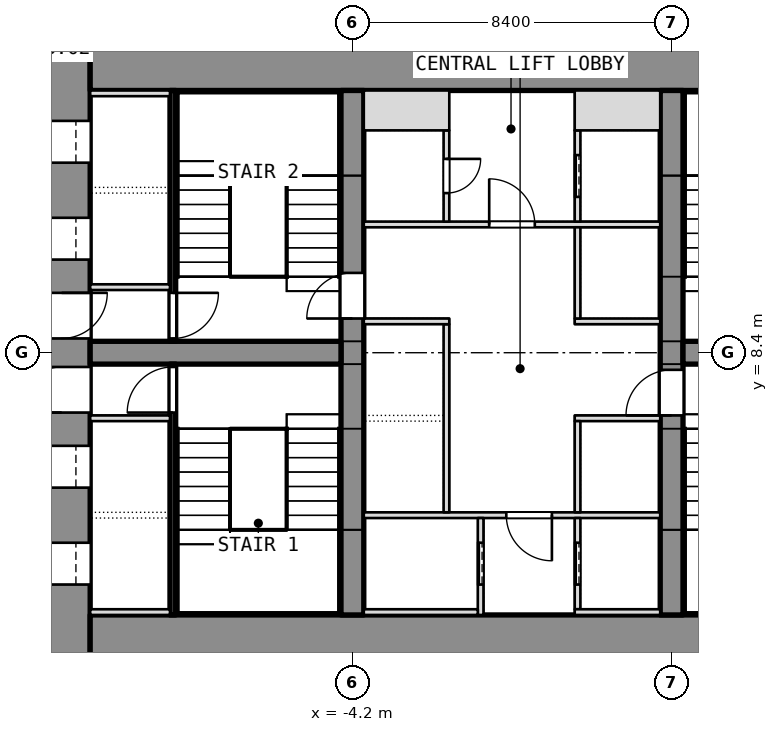
"""IFC4 building model, lengths in metres.
Left out: names, types, materials, properties, quantities, classifications, styles, units other than length and angle.
Written with IfcOpenShell. Run it as: python <this file> out.ifc"""

import sys

from ifc_helpers import new_model, si_unit, direction, frame, frame_2d, origin, place, context, subcontext, project, spatial, rectangle, extrude, element, fill, save


model = new_model("IFC4")
c1 = context("Model", 3, precision=1e-05, world=origin(), true_north=direction((0.0, 1.0)))
c2 = subcontext(c1, "Body", "Model", "MODEL_VIEW")
j1 = project(units=[si_unit("LENGTHUNIT", "METRE"), si_unit("PLANEANGLEUNIT", "RADIAN")], contexts=[c1])
p1 = place(None, origin())
s1 = spatial("IfcSite", under=j1, at=p1, CompositionType="ELEMENT")
p2 = place(p1, origin())
s2 = spatial("IfcBuilding", under=s1, at=p2, CompositionType="ELEMENT")
p3 = place(p2, frame((0.0, 0.0, 8.0)))
s3 = spatial("IfcBuildingStorey", under=s2, at=p3, CompositionType="ELEMENT", Elevation=8.0)
p4 = place(p3, frame((-11.85, 0.0, 0.0), z_axis=(0.0, 0.0, 1.0), x_axis=(0.0, 1.0, 0.0)))
e1 = element("IfcWall", 1, at=p4, inside=s3, PredefinedType="SHEAR", context=c2, shape_type="SweptSolid", body=[
    extrude(rectangle(XDim=16.8, YDim=1.5, at=frame_2d((8.4, 0.0))), origin(), (0.0, 0.0, 1.0), 5.0),
])
p5 = place(p4, frame((2.3, 0.0, 0.0)))
e2 = element("IfcOpeningElement", 2, at=p5, cuts=e1, PredefinedType="OPENING", context=c2, shape_type="SweptSolid", body=[
    extrude(rectangle(XDim=1.1, YDim=2.1, at=frame_2d((0.55, 1.05))), frame((0.0, 0.75, 0.0), z_axis=(0.0, -1.0, 0.0), x_axis=(1.0, 0.0, 0.0)), (0.0, 0.0, 1.0), 1.5),
])
p6 = place(p4, frame((4.85, 0.0, 0.0)))
e3 = element("IfcOpeningElement", 3, at=p6, cuts=e1, PredefinedType="OPENING", context=c2, shape_type="SweptSolid", body=[
    extrude(rectangle(XDim=1.1, YDim=2.1, at=frame_2d((0.55, 1.05))), frame((0.0, 0.75, 0.0), z_axis=(0.0, -1.0, 0.0), x_axis=(1.0, 0.0, 0.0)), (0.0, 0.0, 1.0), 1.5),
])
p7 = place(p4, frame((6.825, 0.0, 0.0)))
e4 = element("IfcOpeningElement", 4, at=p7, cuts=e1, PredefinedType="OPENING", context=c2, shape_type="SweptSolid", body=[
    extrude(rectangle(XDim=1.2, YDim=2.1, at=frame_2d((0.6, 1.05))), frame((0.0, 0.75, 0.0), z_axis=(0.0, -1.0, 0.0), x_axis=(1.0, 0.0, 0.0)), (0.0, 0.0, 1.0), 1.5),
])
p8 = place(p4, frame((13.4, 0.0, 0.0)))
e5 = element("IfcOpeningElement", 5, at=p8, cuts=e1, PredefinedType="OPENING", context=c2, shape_type="SweptSolid", body=[
    extrude(rectangle(XDim=1.1, YDim=2.1, at=frame_2d((0.55, 1.05))), frame((0.0, 0.75, 0.0), z_axis=(0.0, -1.0, 0.0), x_axis=(1.0, 0.0, 0.0)), (0.0, 0.0, 1.0), 1.5),
])
p9 = place(p4, frame((10.85, 0.0, 0.0)))
e6 = element("IfcOpeningElement", 6, at=p9, cuts=e1, PredefinedType="OPENING", context=c2, shape_type="SweptSolid", body=[
    extrude(rectangle(XDim=1.1, YDim=2.1, at=frame_2d((0.55, 1.05))), frame((0.0, 0.75, 0.0), z_axis=(0.0, -1.0, 0.0), x_axis=(1.0, 0.0, 0.0)), (0.0, 0.0, 1.0), 1.5),
])
p10 = place(p4, frame((8.775, 0.0, 0.0)))
e7 = element("IfcOpeningElement", 7, at=p10, cuts=e1, PredefinedType="OPENING", context=c2, shape_type="SweptSolid", body=[
    extrude(rectangle(XDim=1.2, YDim=2.1, at=frame_2d((0.6, 1.05))), frame((0.0, 0.75, 0.0), z_axis=(0.0, -1.0, 0.0), x_axis=(1.0, 0.0, 0.0)), (0.0, 0.0, 1.0), 1.5),
])
for number, where, z_axis, x_axis in (
    (8, (-11.1, 0.75, 0.0), (0.0, 0.0, 1.0), (1.0, 0.0, 0.0)),
    (9, (-11.1, 16.05, 0.0), (0.0, 0.0, 1.0), (1.0, 0.0, 0.0)),
):
    element("IfcWall", number, at=place(p3, frame(where, z_axis=z_axis, x_axis=x_axis)), inside=s3, PredefinedType="SHEAR", context=c2, shape_type="SweptSolid", body=[
        extrude(rectangle(XDim=22.2, YDim=1.5, at=frame_2d((11.1, 0.0))), origin(), (0.0, 0.0, 1.0), 5.0),
    ])
p11 = place(p3, frame((-4.2, 1.5, 0.0), z_axis=(0.0, 0.0, 1.0), x_axis=(0.0, 1.0, 0.0)))
e10 = element("IfcWall", 10, at=p11, inside=s3, PredefinedType="SHEAR", context=c2, shape_type="SweptSolid", body=[
    extrude(rectangle(XDim=13.8, YDim=0.6, at=frame_2d((6.9, 0.0))), origin(), (0.0, 0.0, 1.0), 5.0),
])
p12 = place(p11, frame((7.8, 0.0, 0.0)))
e11 = element("IfcOpeningElement", 11, at=p12, cuts=e10, PredefinedType="OPENING", context=c2, shape_type="SweptSolid", body=[
    extrude(rectangle(XDim=1.2, YDim=2.1, at=frame_2d((0.6, 1.05))), frame((0.0, 0.3, 0.0), z_axis=(0.0, -1.0, 0.0), x_axis=(1.0, 0.0, 0.0)), (0.0, 0.0, 1.0), 0.6),
])
p13 = place(p3, frame((4.2, 1.5, 0.0), z_axis=(0.0, 0.0, 1.0), x_axis=(0.0, 1.0, 0.0)))
e12 = element("IfcWall", 12, at=p13, inside=s3, PredefinedType="SHEAR", context=c2, shape_type="SweptSolid", body=[
    extrude(rectangle(XDim=13.8, YDim=0.6, at=frame_2d((6.9, 0.0))), origin(), (0.0, 0.0, 1.0), 5.0),
])
p14 = place(p13, frame((5.25, 0.0, 0.0)))
e13 = element("IfcOpeningElement", 13, at=p14, cuts=e12, PredefinedType="OPENING", context=c2, shape_type="SweptSolid", body=[
    extrude(rectangle(XDim=1.2, YDim=2.1, at=frame_2d((0.6, 1.05))), frame((0.0, 0.3, 0.0), z_axis=(0.0, -1.0, 0.0), x_axis=(1.0, 0.0, 0.0)), (0.0, 0.0, 1.0), 0.6),
])
for number, where, z_axis, x_axis in (
    (14, (-11.1, 8.4, 0.0), (0.0, 0.0, 1.0), (1.0, 0.0, 0.0)),
    (15, (4.5, 8.4, 0.0), (0.0, 0.0, 1.0), (1.0, 0.0, 0.0)),
):
    element("IfcWall", number, at=place(p3, frame(where, z_axis=z_axis, x_axis=x_axis)), inside=s3, PredefinedType="SHEAR", context=c2, shape_type="SweptSolid", body=[
        extrude(rectangle(XDim=6.6, YDim=0.6, at=frame_2d((3.3, 0.0))), origin(), (0.0, 0.0, 1.0), 5.0),
    ])
p15 = place(p3, frame((-8.925, 1.5, 0.0), z_axis=(0.0, 0.0, 1.0), x_axis=(0.0, 1.0, 0.0)))
e16 = element("IfcWall", 16, at=p15, inside=s3, PredefinedType="SHEAR", context=c2, shape_type="SweptSolid", body=[
    extrude(rectangle(XDim=6.6, YDim=0.15, at=frame_2d((3.3, 0.0))), origin(), (0.0, 0.0, 1.0), 4.78),
])
p16 = place(p15, frame((5.325, 0.0, 0.0)))
e17 = element("IfcOpeningElement", 17, at=p16, cuts=e16, PredefinedType="OPENING", context=c2, shape_type="SweptSolid", body=[
    extrude(rectangle(XDim=1.2, YDim=2.1, at=frame_2d((0.6, 1.05))), frame((0.0, 0.075, 0.0), z_axis=(0.0, -1.0, 0.0), x_axis=(1.0, 0.0, 0.0)), (0.0, 0.0, 1.0), 0.15),
])
for number, where, z_axis, x_axis in (
    (18, (-11.1, 6.675, 0.0), (0.0, 0.0, 1.0), (1.0, 0.0, 0.0)),
    (19, (-11.1, 1.575, 0.0), (0.0, 0.0, 1.0), (1.0, 0.0, 0.0)),
):
    element("IfcWall", number, at=place(p3, frame(where, z_axis=z_axis, x_axis=x_axis)), inside=s3, PredefinedType="SHEAR", context=c2, shape_type="SweptSolid", body=[
        extrude(rectangle(XDim=2.1, YDim=0.15, at=frame_2d((1.05, 0.0))), origin(), (0.0, 0.0, 1.0), 5.0),
    ])
p17 = place(p3, frame((-8.925, 8.7, 0.0), z_axis=(0.0, 0.0, 1.0), x_axis=(0.0, 1.0, 0.0)))
e20 = element("IfcWall", 20, at=p17, inside=s3, PredefinedType="SHEAR", context=c2, shape_type="SweptSolid", body=[
    extrude(rectangle(XDim=6.6, YDim=0.15, at=frame_2d((3.3, 0.0))), origin(), (0.0, 0.0, 1.0), 4.78),
])
p18 = place(p17, frame((0.075, 0.0, 0.0)))
e21 = element("IfcOpeningElement", 21, at=p18, cuts=e20, PredefinedType="OPENING", context=c2, shape_type="SweptSolid", body=[
    extrude(rectangle(XDim=1.2, YDim=2.1, at=frame_2d((0.6, 1.05))), frame((0.0, 0.075, 0.0), z_axis=(0.0, -1.0, 0.0), x_axis=(1.0, 0.0, 0.0)), (0.0, 0.0, 1.0), 0.15),
])
for number, where, z_axis, x_axis in (
    (22, (-11.1, 10.125, 0.0), (0.0, 0.0, 1.0), (1.0, 0.0, 0.0)),
    (23, (-11.1, 15.225, 0.0), (0.0, 0.0, 1.0), (1.0, 0.0, 0.0)),
):
    element("IfcWall", number, at=place(p3, frame(where, z_axis=z_axis, x_axis=x_axis)), inside=s3, PredefinedType="SHEAR", context=c2, shape_type="SweptSolid", body=[
        extrude(rectangle(XDim=2.1, YDim=0.15, at=frame_2d((1.05, 0.0))), origin(), (0.0, 0.0, 1.0), 5.0),
    ])
p19 = place(p3, frame((-3.9, 4.125, 0.0), z_axis=(0.0, 0.0, 1.0), x_axis=(1.0, 0.0, 0.0)))
e24 = element("IfcWall", 24, at=p19, inside=s3, PredefinedType="PARTITIONING", context=c2, shape_type="SweptSolid", body=[
    extrude(rectangle(XDim=7.8, YDim=0.15, at=frame_2d((3.9, 0.0))), origin(), (0.0, 0.0, 1.0), 4.78),
])
p20 = place(p19, frame((3.75, 0.0, 0.0)))
e25 = element("IfcOpeningElement", 25, at=p20, cuts=e24, PredefinedType="OPENING", context=c2, shape_type="SweptSolid", body=[
    extrude(rectangle(XDim=1.2, YDim=2.1, at=frame_2d((0.6, 1.05))), frame((0.0, 0.075, 0.0), z_axis=(0.0, -1.0, 0.0), x_axis=(1.0, 0.0, 0.0)), (0.0, 0.0, 1.0), 0.15),
])
p21 = place(p3, frame((-3.9, 11.775, 0.0), z_axis=(0.0, 0.0, 1.0), x_axis=(1.0, 0.0, 0.0)))
e26 = element("IfcWall", 26, at=p21, inside=s3, PredefinedType="PARTITIONING", context=c2, shape_type="SweptSolid", body=[
    extrude(rectangle(XDim=7.8, YDim=0.15, at=frame_2d((3.9, 0.0))), origin(), (0.0, 0.0, 1.0), 4.78),
])
p22 = place(p21, frame((3.3, 0.0, 0.0)))
e27 = element("IfcOpeningElement", 27, at=p22, cuts=e26, PredefinedType="OPENING", context=c2, shape_type="SweptSolid", body=[
    extrude(rectangle(XDim=1.2, YDim=2.1, at=frame_2d((0.6, 1.05))), frame((0.0, 0.075, 0.0), z_axis=(0.0, -1.0, 0.0), x_axis=(1.0, 0.0, 0.0)), (0.0, 0.0, 1.0), 0.15),
])
p23 = place(p3, frame((-0.825, 1.5, 0.0), z_axis=(0.0, 0.0, 1.0), x_axis=(0.0, 1.0, 0.0)))
e28 = element("IfcWall", 28, at=p23, inside=s3, PredefinedType="SHEAR", context=c2, shape_type="SweptSolid", body=[
    extrude(rectangle(XDim=2.55, YDim=0.15, at=frame_2d((1.275, 0.0))), origin(), (0.0, 0.0, 1.0), 5.0),
])
p24 = place(p23, frame((0.8, 0.0, 0.0)))
e29 = element("IfcOpeningElement", 29, at=p24, cuts=e28, PredefinedType="OPENING", context=c2, shape_type="SweptSolid", body=[
    extrude(rectangle(XDim=1.1, YDim=2.1, at=frame_2d((0.55, 1.05))), frame((0.0, 0.075, 0.0), z_axis=(0.0, -1.0, 0.0), x_axis=(1.0, 0.0, 0.0)), (0.0, 0.0, 1.0), 0.15),
])
p25 = place(p3, frame((-3.9, 1.575, 0.0), z_axis=(0.0, 0.0, 1.0), x_axis=(1.0, 0.0, 0.0)))
e30 = element("IfcWall", 30, at=p25, inside=s3, PredefinedType="SHEAR", context=c2, shape_type="SweptSolid", body=[
    extrude(rectangle(XDim=3.0, YDim=0.15, at=frame_2d((1.5, 0.0))), origin(), (0.0, 0.0, 1.0), 5.0),
])
p26 = place(p3, frame((-1.725, 4.2, 0.0), z_axis=(0.0, 0.0, 1.0), x_axis=(0.0, 1.0, 0.0)))
e31 = element("IfcWall", 31, at=p26, inside=s3, PredefinedType="SHEAR", context=c2, shape_type="SweptSolid", body=[
    extrude(rectangle(XDim=4.95, YDim=0.15, at=frame_2d((2.475, 0.0))), origin(), (0.0, 0.0, 1.0), 5.0),
])
p27 = place(p3, frame((-3.9, 9.225, 0.0), z_axis=(0.0, 0.0, 1.0), x_axis=(1.0, 0.0, 0.0)))
e32 = element("IfcWall", 32, at=p27, inside=s3, PredefinedType="SHEAR", context=c2, shape_type="SweptSolid", body=[
    extrude(rectangle(XDim=2.25, YDim=0.15, at=frame_2d((1.125, 0.0))), origin(), (0.0, 0.0, 1.0), 5.0),
])
p28 = place(p3, frame((-1.725, 11.85, 0.0), z_axis=(0.0, 0.0, 1.0), x_axis=(0.0, 1.0, 0.0)))
e33 = element("IfcWall", 33, at=p28, inside=s3, PredefinedType="PARTITIONING", context=c2, shape_type="SweptSolid", body=[
    extrude(rectangle(XDim=2.4, YDim=0.15, at=frame_2d((1.2, 0.0))), origin(), (0.0, 0.0, 1.0), 4.78),
])
p29 = place(p28, frame((0.75, 0.0, 0.0)))
e34 = element("IfcOpeningElement", 34, at=p29, cuts=e33, PredefinedType="OPENING", context=c2, shape_type="SweptSolid", body=[
    extrude(rectangle(XDim=0.9, YDim=2.1, at=frame_2d((0.45, 1.05))), frame((0.0, 0.075, 0.0), z_axis=(0.0, -1.0, 0.0), x_axis=(1.0, 0.0, 0.0)), (0.0, 0.0, 1.0), 0.15),
])
p30 = place(p3, frame((-3.9, 14.775, 0.0), z_axis=(0.0, 0.0, 1.0), x_axis=(1.0, 0.0, 0.0)))
e35 = element("IfcWall", 35, at=p30, inside=s3, PredefinedType="PARTITIONING", context=c2, shape_type="SweptSolid", body=[
    extrude(rectangle(XDim=2.25, YDim=1.05, at=frame_2d((1.125, 0.0))), origin(), (0.0, 0.0, 1.0), 4.78),
])
p31 = place(p3, frame((1.725, 1.65, 0.0), z_axis=(0.0, 0.0, 1.0), x_axis=(0.0, 1.0, 0.0)))
e36 = element("IfcWall", 36, at=p31, inside=s3, PredefinedType="SHEAR", context=c2, shape_type="SweptSolid", body=[
    extrude(rectangle(XDim=2.4, YDim=0.15, at=frame_2d((1.2, 0.0))), origin(), (0.0, 0.0, 1.0), 5.0),
])
p32 = place(p31, frame((0.65, 0.0, 0.0)))
e37 = element("IfcOpeningElement", 37, at=p32, cuts=e36, PredefinedType="OPENING", context=c2, shape_type="SweptSolid", body=[
    extrude(rectangle(XDim=1.1, YDim=2.1, at=frame_2d((0.55, 1.05))), frame((0.0, 0.075, 0.0), z_axis=(0.0, -1.0, 0.0), x_axis=(1.0, 0.0, 0.0)), (0.0, 0.0, 1.0), 0.15),
])
p33 = place(p3, frame((1.65, 1.575, 0.0), z_axis=(0.0, 0.0, 1.0), x_axis=(1.0, 0.0, 0.0)))
e38 = element("IfcWall", 38, at=p33, inside=s3, PredefinedType="SHEAR", context=c2, shape_type="SweptSolid", body=[
    extrude(rectangle(XDim=2.25, YDim=0.15, at=frame_2d((1.125, 0.0))), origin(), (0.0, 0.0, 1.0), 5.0),
])
p34 = place(p3, frame((1.725, 11.85, 0.0), z_axis=(0.0, 0.0, 1.0), x_axis=(0.0, 1.0, 0.0)))
e39 = element("IfcWall", 39, at=p34, inside=s3, PredefinedType="SHEAR", context=c2, shape_type="SweptSolid", body=[
    extrude(rectangle(XDim=2.4, YDim=0.15, at=frame_2d((1.2, 0.0))), origin(), (0.0, 0.0, 1.0), 5.0),
])
p35 = place(p34, frame((0.65, 0.0, 0.0)))
e40 = element("IfcOpeningElement", 40, at=p35, cuts=e39, PredefinedType="OPENING", context=c2, shape_type="SweptSolid", body=[
    extrude(rectangle(XDim=1.1, YDim=2.1, at=frame_2d((0.55, 1.05))), frame((0.0, 0.075, 0.0), z_axis=(0.0, -1.0, 0.0), x_axis=(1.0, 0.0, 0.0)), (0.0, 0.0, 1.0), 0.15),
])
p36 = place(p3, frame((1.65, 14.775, 0.0), z_axis=(0.0, 0.0, 1.0), x_axis=(1.0, 0.0, 0.0)))
e41 = element("IfcWall", 41, at=p36, inside=s3, PredefinedType="SHEAR", context=c2, shape_type="SweptSolid", body=[
    extrude(rectangle(XDim=2.25, YDim=1.05, at=frame_2d((1.125, 0.0))), origin(), (0.0, 0.0, 1.0), 5.0),
])
for number, where, z_axis, x_axis in (
    (42, (1.65, 6.675, 0.0), (0.0, 0.0, 1.0), (1.0, 0.0, 0.0)),
    (43, (1.65, 9.225, 0.0), (0.0, 0.0, 1.0), (1.0, 0.0, 0.0)),
):
    element("IfcWall", number, at=place(p3, frame(where, z_axis=z_axis, x_axis=x_axis)), inside=s3, PredefinedType="SHEAR", context=c2, shape_type="SweptSolid", body=[
        extrude(rectangle(XDim=2.25, YDim=0.15, at=frame_2d((1.125, 0.0))), origin(), (0.0, 0.0, 1.0), 5.0),
    ])
p37 = place(p3, frame((1.725, 4.2, 0.0), z_axis=(0.0, 0.0, 1.0), x_axis=(0.0, 1.0, 0.0)))
e44 = element("IfcWall", 44, at=p37, inside=s3, PredefinedType="SHEAR", context=c2, shape_type="SweptSolid", body=[
    extrude(rectangle(XDim=2.4, YDim=0.15, at=frame_2d((1.2, 0.0))), origin(), (0.0, 0.0, 1.0), 5.0),
])
p38 = place(p3, frame((1.725, 9.3, 0.0), z_axis=(0.0, 0.0, 1.0), x_axis=(0.0, 1.0, 0.0)))
e45 = element("IfcWall", 45, at=p38, inside=s3, PredefinedType="SHEAR", context=c2, shape_type="SweptSolid", body=[
    extrude(rectangle(XDim=2.4, YDim=0.15, at=frame_2d((1.2, 0.0))), origin(), (0.0, 0.0, 1.0), 5.0),
])
p39 = place(p5, origin())
e46 = element("IfcDoor", 46, at=p39, inside=s3, OperationType="SLIDING_TO_LEFT", PredefinedType="DOOR", context=c2, shape_type="SweptSolid", body=[
    extrude(rectangle(XDim=1.1, YDim=2.1, at=frame_2d((0.55, 1.05))), frame((0.0, 0.025, 0.0), z_axis=(0.0, -1.0, 0.0), x_axis=(1.0, 0.0, 0.0)), (0.0, 0.0, 1.0), 0.05),
])
fill(e2, e46)
p40 = place(p6, origin())
e47 = element("IfcDoor", 47, at=p40, inside=s3, OperationType="SLIDING_TO_LEFT", PredefinedType="DOOR", context=c2, shape_type="SweptSolid", body=[
    extrude(rectangle(XDim=1.1, YDim=2.1, at=frame_2d((0.55, 1.05))), frame((0.0, 0.025, 0.0), z_axis=(0.0, -1.0, 0.0), x_axis=(1.0, 0.0, 0.0)), (0.0, 0.0, 1.0), 0.05),
])
fill(e3, e47)
p41 = place(p7, origin())
e48 = element("IfcDoor", 48, at=p41, inside=s3, OperationType="SINGLE_SWING_LEFT", PredefinedType="DOOR", context=c2, shape_type="SweptSolid", body=[
    extrude(rectangle(XDim=1.2, YDim=2.1, at=frame_2d((0.6, 1.05))), frame((0.0, 0.025, 0.0), z_axis=(0.0, -1.0, 0.0), x_axis=(1.0, 0.0, 0.0)), (0.0, 0.0, 1.0), 0.05),
])
fill(e4, e48)
p42 = place(p16, origin())
e49 = element("IfcDoor", 49, at=p42, inside=s3, OperationType="SINGLE_SWING_LEFT", PredefinedType="DOOR", context=c2, shape_type="SweptSolid", body=[
    extrude(rectangle(XDim=1.2, YDim=2.1, at=frame_2d((0.6, 1.05))), frame((0.0, 0.025, 0.0), z_axis=(0.0, -1.0, 0.0), x_axis=(1.0, 0.0, 0.0)), (0.0, 0.0, 1.0), 0.05),
])
fill(e17, e49)
p43 = place(p8, origin())
e50 = element("IfcDoor", 50, at=p43, inside=s3, OperationType="SLIDING_TO_LEFT", PredefinedType="DOOR", context=c2, shape_type="SweptSolid", body=[
    extrude(rectangle(XDim=1.1, YDim=2.1, at=frame_2d((0.55, 1.05))), frame((0.0, 0.025, 0.0), z_axis=(0.0, -1.0, 0.0), x_axis=(1.0, 0.0, 0.0)), (0.0, 0.0, 1.0), 0.05),
])
fill(e5, e50)
p44 = place(p9, origin())
e51 = element("IfcDoor", 51, at=p44, inside=s3, OperationType="SLIDING_TO_LEFT", PredefinedType="DOOR", context=c2, shape_type="SweptSolid", body=[
    extrude(rectangle(XDim=1.1, YDim=2.1, at=frame_2d((0.55, 1.05))), frame((0.0, 0.025, 0.0), z_axis=(0.0, -1.0, 0.0), x_axis=(1.0, 0.0, 0.0)), (0.0, 0.0, 1.0), 0.05),
])
fill(e6, e51)
p45 = place(p10, origin())
e52 = element("IfcDoor", 52, at=p45, inside=s3, OperationType="SINGLE_SWING_LEFT", PredefinedType="DOOR", context=c2, shape_type="SweptSolid", body=[
    extrude(rectangle(XDim=1.2, YDim=2.1, at=frame_2d((0.6, 1.05))), frame((0.0, 0.025, 0.0), z_axis=(0.0, -1.0, 0.0), x_axis=(1.0, 0.0, 0.0)), (0.0, 0.0, 1.0), 0.05),
])
fill(e7, e52)
p46 = place(p18, origin())
e53 = element("IfcDoor", 53, at=p46, inside=s3, OperationType="SINGLE_SWING_LEFT", PredefinedType="DOOR", context=c2, shape_type="SweptSolid", body=[
    extrude(rectangle(XDim=1.2, YDim=2.1, at=frame_2d((0.6, 1.05))), frame((0.0, 0.025, 0.0), z_axis=(0.0, -1.0, 0.0), x_axis=(1.0, 0.0, 0.0)), (0.0, 0.0, 1.0), 0.05),
])
fill(e21, e53)
p47 = place(p24, origin())
e54 = element("IfcDoor", 54, at=p47, inside=s3, OperationType="SLIDING_TO_LEFT", PredefinedType="DOOR", context=c2, shape_type="SweptSolid", body=[
    extrude(rectangle(XDim=1.1, YDim=2.1, at=frame_2d((0.55, 1.05))), frame((0.0, 0.025, 0.0), z_axis=(0.0, -1.0, 0.0), x_axis=(1.0, 0.0, 0.0)), (0.0, 0.0, 1.0), 0.05),
])
fill(e29, e54)
p48 = place(p32, origin())
e55 = element("IfcDoor", 55, at=p48, inside=s3, OperationType="SLIDING_TO_LEFT", PredefinedType="DOOR", context=c2, shape_type="SweptSolid", body=[
    extrude(rectangle(XDim=1.1, YDim=2.1, at=frame_2d((0.55, 1.05))), frame((0.0, 0.025, 0.0), z_axis=(0.0, -1.0, 0.0), x_axis=(1.0, 0.0, 0.0)), (0.0, 0.0, 1.0), 0.05),
])
fill(e37, e55)
p49 = place(p35, origin())
e56 = element("IfcDoor", 56, at=p49, inside=s3, OperationType="SLIDING_TO_LEFT", PredefinedType="DOOR", context=c2, shape_type="SweptSolid", body=[
    extrude(rectangle(XDim=1.1, YDim=2.1, at=frame_2d((0.55, 1.05))), frame((0.0, 0.025, 0.0), z_axis=(0.0, -1.0, 0.0), x_axis=(1.0, 0.0, 0.0)), (0.0, 0.0, 1.0), 0.05),
])
fill(e40, e56)
p50 = place(p20, origin())
e57 = element("IfcDoor", 57, at=p50, inside=s3, OperationType="SINGLE_SWING_LEFT", PredefinedType="DOOR", context=c2, shape_type="SweptSolid", body=[
    extrude(rectangle(XDim=1.2, YDim=2.1, at=frame_2d((0.6, 1.05))), frame((0.0, 0.025, 0.0), z_axis=(0.0, -1.0, 0.0), x_axis=(1.0, 0.0, 0.0)), (0.0, 0.0, 1.0), 0.05),
])
fill(e25, e57)
p51 = place(p22, origin())
e58 = element("IfcDoor", 58, at=p51, inside=s3, OperationType="SINGLE_SWING_LEFT", PredefinedType="DOOR", context=c2, shape_type="SweptSolid", body=[
    extrude(rectangle(XDim=1.2, YDim=2.1, at=frame_2d((0.6, 1.05))), frame((0.0, 0.025, 0.0), z_axis=(0.0, -1.0, 0.0), x_axis=(1.0, 0.0, 0.0)), (0.0, 0.0, 1.0), 0.05),
])
fill(e27, e58)
p52 = place(p29, origin())
e59 = element("IfcDoor", 59, at=p52, inside=s3, OperationType="SINGLE_SWING_LEFT", PredefinedType="DOOR", context=c2, shape_type="SweptSolid", body=[
    extrude(rectangle(XDim=0.9, YDim=2.1, at=frame_2d((0.45, 1.05))), frame((0.0, 0.025, 0.0), z_axis=(0.0, -1.0, 0.0), x_axis=(1.0, 0.0, 0.0)), (0.0, 0.0, 1.0), 0.05),
])
fill(e34, e59)
p53 = place(p12, origin())
e60 = element("IfcDoor", 60, at=p53, inside=s3, OperationType="SINGLE_SWING_LEFT", PredefinedType="DOOR", context=c2, shape_type="SweptSolid", body=[
    extrude(rectangle(XDim=1.2, YDim=2.1, at=frame_2d((0.6, 1.05))), frame((0.0, 0.025, 0.0), z_axis=(0.0, -1.0, 0.0), x_axis=(1.0, 0.0, 0.0)), (0.0, 0.0, 1.0), 0.05),
])
fill(e11, e60)
p54 = place(p14, origin())
e61 = element("IfcDoor", 61, at=p54, inside=s3, OperationType="SINGLE_SWING_LEFT", PredefinedType="DOOR", context=c2, shape_type="SweptSolid", body=[
    extrude(rectangle(XDim=1.2, YDim=2.1, at=frame_2d((0.6, 1.05))), frame((0.0, 0.025, 0.0), z_axis=(0.0, -1.0, 0.0), x_axis=(1.0, 0.0, 0.0)), (0.0, 0.0, 1.0), 0.05),
])
fill(e13, e61)
save(model, sys.argv[1])
